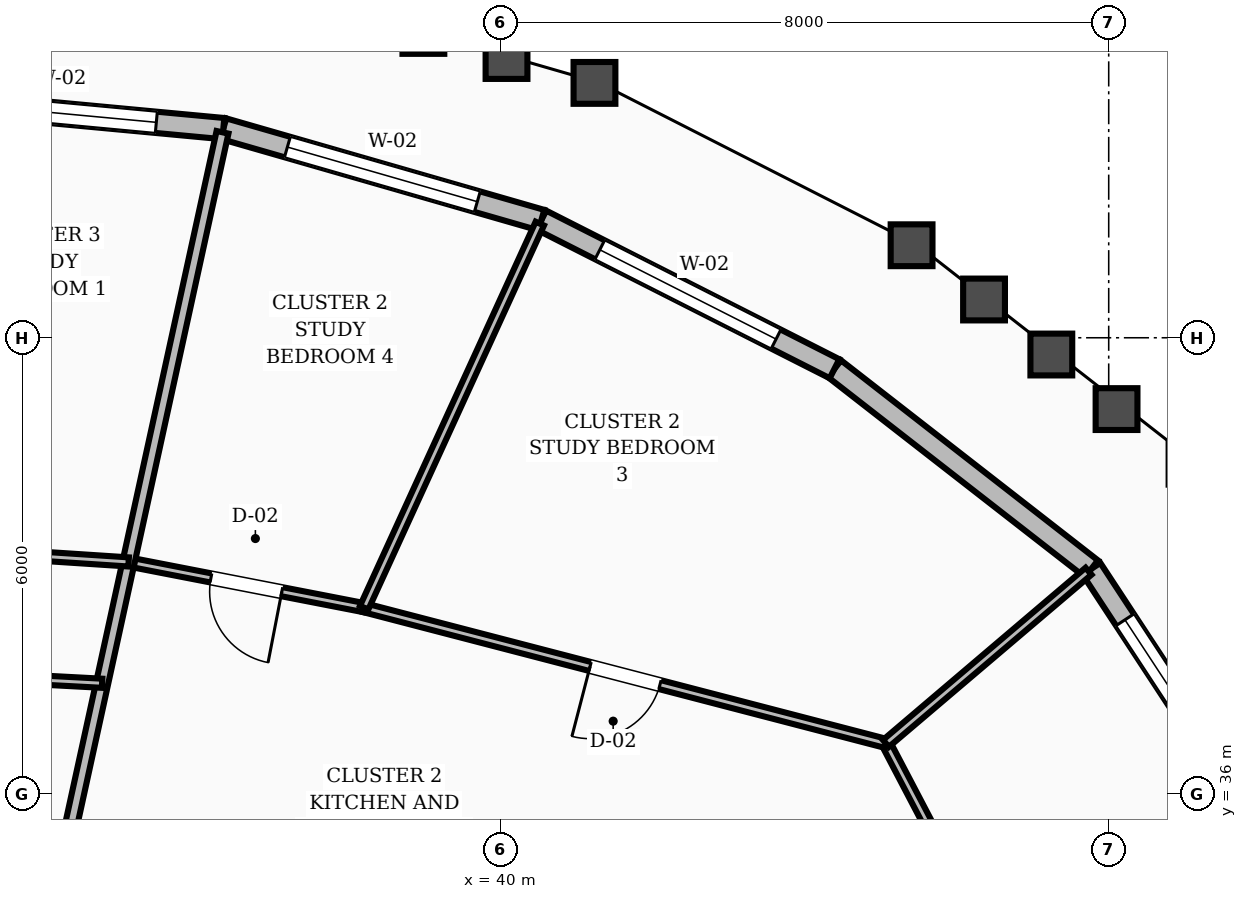
"""IFC4 building model, lengths in metres.
Left out: names, types, materials, properties, quantities, classifications, styles, units other than length and angle.
Written with IfcOpenShell. Run it as: python <this file> out.ifc"""

import sys

from ifc_helpers import new_model, si_unit, direction, frame, frame_2d, origin, place, context, subcontext, project, spatial, rectangle, extrude, element, fill, save


model = new_model("IFC4")
c1 = context("Model", 3, precision=1e-05, world=origin(), true_north=direction((0.0, 1.0)))
c2 = subcontext(c1, "Body", "Model", "MODEL_VIEW")
j1 = project(units=[si_unit("LENGTHUNIT", "METRE"), si_unit("PLANEANGLEUNIT", "RADIAN")], contexts=[c1])
p1 = place(None, origin())
s1 = spatial("IfcSite", under=j1, at=p1, CompositionType="ELEMENT")
p2 = place(p1, origin())
s2 = spatial("IfcBuilding", under=s1, at=p2, CompositionType="ELEMENT")
p3 = place(p2, frame((0.0, 0.0, 232.8)))
s3 = spatial("IfcBuildingStorey", under=s2, at=p3, CompositionType="ELEMENT", Elevation=232.8)
p4 = place(p3, frame((50.132, 35.367, 0.0), z_axis=(0.0, 0.0, 1.0), x_axis=(-0.548657681843, 0.836047096852, 0.0)))
e1 = element("IfcWall", 1, at=p4, inside=s3, PredefinedType="STANDARD", context=c2, shape_type="SweptSolid", body=[
    extrude(rectangle(XDim=4.299, YDim=0.28, at=frame_2d((2.15, 0.0))), origin(), (0.0, 0.0, 1.0), 2.88),
])
p5 = place(p4, frame((0.896, 0.0, 0.8)))
e2 = element("IfcOpeningElement", 2, at=p5, cuts=e1, PredefinedType="OPENING", context=c2, shape_type="SweptSolid", body=[
    extrude(rectangle(XDim=2.6, YDim=1.65, at=frame_2d((1.3, 0.825))), frame((0.0, 0.15, 0.0), z_axis=(0.0, -1.0, 0.0), x_axis=(1.0, 0.0, 0.0)), (0.0, 0.0, 1.0), 0.3),
])
p6 = place(p3, frame((47.773, 38.961, 0.0), z_axis=(0.0, 0.0, 1.0), x_axis=(-0.789112773216, 0.614248346475, 0.0)))
e3 = element("IfcWall", 3, at=p6, inside=s3, PredefinedType="STANDARD", context=c2, shape_type="SweptSolid", body=[
    extrude(rectangle(XDim=4.283, YDim=0.28, at=frame_2d((2.142, 0.0))), origin(), (0.0, 0.0, 1.0), 2.88),
])
p7 = place(p3, frame((44.393, 41.592, 0.0), z_axis=(0.0, 0.0, 1.0), x_axis=(-0.891906133231, 0.452220576162, 0.0)))
e4 = element("IfcWall", 4, at=p7, inside=s3, PredefinedType="STANDARD", context=c2, shape_type="SweptSolid", body=[
    extrude(rectangle(XDim=4.324, YDim=0.28, at=frame_2d((2.162, 0.0))), origin(), (0.0, 0.0, 1.0), 2.88),
])
p8 = place(p7, frame((0.862, 0.0, 0.8)))
e5 = element("IfcOpeningElement", 5, at=p8, cuts=e4, PredefinedType="OPENING", context=c2, shape_type="SweptSolid", body=[
    extrude(rectangle(XDim=2.6, YDim=1.65, at=frame_2d((1.3, 0.825))), frame((0.0, 0.15, 0.0), z_axis=(0.0, -1.0, 0.0), x_axis=(1.0, 0.0, 0.0)), (0.0, 0.0, 1.0), 0.3),
])
p9 = place(p3, frame((40.536, 43.548, 0.0), z_axis=(0.0, 0.0, 1.0), x_axis=(-0.961001713186, 0.276542414927, 0.0)))
e6 = element("IfcWall", 6, at=p9, inside=s3, PredefinedType="STANDARD", context=c2, shape_type="SweptSolid", body=[
    extrude(rectangle(XDim=4.354, YDim=0.28, at=frame_2d((2.177, 0.0))), origin(), (0.0, 0.0, 1.0), 2.88),
])
p10 = place(p9, frame((0.877, 0.0, 0.8)))
e7 = element("IfcOpeningElement", 7, at=p10, cuts=e6, PredefinedType="OPENING", context=c2, shape_type="SweptSolid", body=[
    extrude(rectangle(XDim=2.6, YDim=1.65, at=frame_2d((1.3, 0.825))), frame((0.0, 0.15, 0.0), z_axis=(0.0, -1.0, 0.0), x_axis=(1.0, 0.0, 0.0)), (0.0, 0.0, 1.0), 0.3),
])
p11 = place(p3, frame((36.352, 44.752, 0.0), z_axis=(0.0, 0.0, 1.0), x_axis=(-0.995665801827, 0.093003285276, 0.0)))
e8 = element("IfcWall", 8, at=p11, inside=s3, PredefinedType="STANDARD", context=c2, shape_type="SweptSolid", body=[
    extrude(rectangle(XDim=4.371, YDim=0.28, at=frame_2d((2.186, 0.0))), origin(), (0.0, 0.0, 1.0), 2.88),
])
p12 = place(p11, frame((0.885, 0.0, 0.8)))
e9 = element("IfcOpeningElement", 9, at=p12, cuts=e8, PredefinedType="OPENING", context=c2, shape_type="SweptSolid", body=[
    extrude(rectangle(XDim=2.6, YDim=1.65, at=frame_2d((1.3, 0.825))), frame((0.0, 0.15, 0.0), z_axis=(0.0, -1.0, 0.0), x_axis=(1.0, 0.0, 0.0)), (0.0, 0.0, 1.0), 0.3),
])
p13 = place(p3, frame((48.285, 30.526, 0.0), z_axis=(0.0, 0.0, 1.0), x_axis=(-0.464213686546, 0.885723237373, 0.0)))
e10 = element("IfcWall", 10, at=p13, inside=s3, PredefinedType="PARTITIONING", context=c2, shape_type="SweptSolid", body=[
    extrude(rectangle(XDim=6.929, YDim=0.12, at=frame_2d((3.464, 0.0))), origin(), (0.0, 0.0, 1.0), 2.87),
])
p14 = place(p13, frame((2.99, 0.0, 0.0)))
e11 = element("IfcOpeningElement", 11, at=p14, cuts=e10, PredefinedType="OPENING", context=c2, shape_type="SweptSolid", body=[
    extrude(rectangle(XDim=0.95, YDim=2.1, at=frame_2d((0.475, 1.05))), frame((0.0, 0.07, 0.0), z_axis=(0.0, -1.0, 0.0), x_axis=(1.0, 0.0, 0.0)), (0.0, 0.0, 1.0), 0.14),
])
p15 = place(p3, frame((45.069, 36.663, 0.0), z_axis=(0.0, 0.0, 1.0), x_axis=(-0.967790308664, 0.251757658186, 0.0)))
e12 = element("IfcWall", 12, at=p15, inside=s3, PredefinedType="PARTITIONING", context=c2, shape_type="SweptSolid", body=[
    extrude(rectangle(XDim=7.093, YDim=0.12, at=frame_2d((3.546, 0.0))), origin(), (0.0, 0.0, 1.0), 2.87),
])
p16 = place(p15, frame((3.071, 0.0, 0.0)))
e13 = element("IfcOpeningElement", 13, at=p16, cuts=e12, PredefinedType="OPENING", context=c2, shape_type="SweptSolid", body=[
    extrude(rectangle(XDim=0.95, YDim=2.1, at=frame_2d((0.475, 1.05))), frame((0.0, 0.07, 0.0), z_axis=(0.0, -1.0, 0.0), x_axis=(1.0, 0.0, 0.0)), (0.0, 0.0, 1.0), 0.14),
])
p17 = place(p3, frame((45.069, 36.663, 0.0), z_axis=(0.0, 0.0, 1.0), x_axis=(0.761978918381, 0.647601828242, 0.0)))
e14 = element("IfcWall", 14, at=p17, inside=s3, PredefinedType="PARTITIONING", context=c2, shape_type="SweptSolid", body=[
    extrude(rectangle(XDim=3.499, YDim=0.12, at=frame_2d((1.749, 0.0))), origin(), (0.0, 0.0, 1.0), 2.87),
])
p18 = place(p3, frame((38.205, 38.449, 0.0), z_axis=(0.0, 0.0, 1.0), x_axis=(-0.981645564912, 0.190714406608, 0.0)))
e15 = element("IfcWall", 15, at=p18, inside=s3, PredefinedType="PARTITIONING", context=c2, shape_type="SweptSolid", body=[
    extrude(rectangle(XDim=3.157, YDim=0.12, at=frame_2d((1.578, 0.0))), origin(), (0.0, 0.0, 1.0), 2.87),
])
p19 = place(p18, frame((1.103, 0.0, 0.0)))
e16 = element("IfcOpeningElement", 16, at=p19, cuts=e15, PredefinedType="OPENING", context=c2, shape_type="SweptSolid", body=[
    extrude(rectangle(XDim=0.95, YDim=2.1, at=frame_2d((0.475, 1.05))), frame((0.0, 0.07, 0.0), z_axis=(0.0, -1.0, 0.0), x_axis=(1.0, 0.0, 0.0)), (0.0, 0.0, 1.0), 0.14),
])
p20 = place(p3, frame((38.205, 38.449, 0.0), z_axis=(0.0, 0.0, 1.0), x_axis=(0.415854245642, 0.909431276338, 0.0)))
e17 = element("IfcWall", 17, at=p20, inside=s3, PredefinedType="PARTITIONING", context=c2, shape_type="SweptSolid", body=[
    extrude(rectangle(XDim=5.557, YDim=0.12, at=frame_2d((2.778, 0.0))), origin(), (0.0, 0.0, 1.0), 2.87),
])
p21 = place(p3, frame((33.86, 33.35, 0.0), z_axis=(0.0, 0.0, 1.0), x_axis=(0.213514549004, 0.976939884212, 0.0)))
e18 = element("IfcWall", 18, at=p21, inside=s3, PredefinedType="SOLIDWALL", context=c2, shape_type="SweptSolid", body=[
    extrude(rectangle(XDim=11.621, YDim=0.16, at=frame_2d((5.811, 0.0))), origin(), (0.0, 0.0, 1.0), 2.87),
])
p22 = place(p3, frame((34.757, 37.455, 0.0), z_axis=(0.0, 0.0, 1.0), x_axis=(-0.998591320033, 0.053060112648, 0.0)))
e19 = element("IfcWall", 19, at=p22, inside=s3, PredefinedType="PARTITIONING", context=c2, shape_type="SweptSolid", body=[
    extrude(rectangle(XDim=2.761, YDim=0.12, at=frame_2d((1.38, 0.0))), origin(), (0.0, 0.0, 1.0), 2.87),
])
p23 = place(p3, frame((35.106, 39.051, 0.0), z_axis=(0.0, 0.0, 1.0), x_axis=(-0.997862906262, 0.06534233165, 0.0)))
e20 = element("IfcWall", 20, at=p23, inside=s3, PredefinedType="PARTITIONING", context=c2, shape_type="SweptSolid", body=[
    extrude(rectangle(XDim=3.112, YDim=0.12, at=frame_2d((1.556, 0.0))), origin(), (0.0, 0.0, 1.0), 2.87),
])
p24 = place(p23, frame((1.081, 0.0, 0.0)))
e21 = element("IfcOpeningElement", 21, at=p24, cuts=e20, PredefinedType="OPENING", context=c2, shape_type="SweptSolid", body=[
    extrude(rectangle(XDim=0.95, YDim=2.1, at=frame_2d((0.475, 1.05))), frame((0.0, 0.07, 0.0), z_axis=(0.0, -1.0, 0.0), x_axis=(1.0, 0.0, 0.0)), (0.0, 0.0, 1.0), 0.14),
])
p25 = place(p5, origin())
e22 = element("IfcWindow", 22, at=p25, inside=s3, PartitioningType="SINGLE_PANEL", PredefinedType="WINDOW", context=c2, shape_type="SweptSolid", body=[
    extrude(rectangle(XDim=2.6, YDim=1.65, at=frame_2d((1.3, 0.825))), frame((0.0, 0.03, 0.0), z_axis=(0.0, -1.0, 0.0), x_axis=(1.0, 0.0, 0.0)), (0.0, 0.0, 1.0), 0.06),
])
fill(e2, e22)
p26 = place(p8, origin())
e23 = element("IfcWindow", 23, at=p26, inside=s3, PartitioningType="SINGLE_PANEL", PredefinedType="WINDOW", context=c2, shape_type="SweptSolid", body=[
    extrude(rectangle(XDim=2.6, YDim=1.65, at=frame_2d((1.3, 0.825))), frame((0.0, 0.03, 0.0), z_axis=(0.0, -1.0, 0.0), x_axis=(1.0, 0.0, 0.0)), (0.0, 0.0, 1.0), 0.06),
])
fill(e5, e23)
p27 = place(p10, origin())
e24 = element("IfcWindow", 24, at=p27, inside=s3, PartitioningType="SINGLE_PANEL", PredefinedType="WINDOW", context=c2, shape_type="SweptSolid", body=[
    extrude(rectangle(XDim=2.6, YDim=1.65, at=frame_2d((1.3, 0.825))), frame((0.0, 0.03, 0.0), z_axis=(0.0, -1.0, 0.0), x_axis=(1.0, 0.0, 0.0)), (0.0, 0.0, 1.0), 0.06),
])
fill(e7, e24)
p28 = place(p12, origin())
e25 = element("IfcWindow", 25, at=p28, inside=s3, PartitioningType="SINGLE_PANEL", PredefinedType="WINDOW", context=c2, shape_type="SweptSolid", body=[
    extrude(rectangle(XDim=2.6, YDim=1.65, at=frame_2d((1.3, 0.825))), frame((0.0, 0.03, 0.0), z_axis=(0.0, -1.0, 0.0), x_axis=(1.0, 0.0, 0.0)), (0.0, 0.0, 1.0), 0.06),
])
fill(e9, e25)
p29 = place(p16, origin())
e26 = element("IfcDoor", 26, at=p29, inside=s3, OperationType="SINGLE_SWING_RIGHT", PredefinedType="DOOR", context=c2, shape_type="SweptSolid", body=[
    extrude(rectangle(XDim=0.95, YDim=2.1, at=frame_2d((0.475, 1.05))), frame((0.0, 0.025, 0.0), z_axis=(0.0, -1.0, 0.0), x_axis=(1.0, 0.0, 0.0)), (0.0, 0.0, 1.0), 0.05),
])
fill(e13, e26)
p30 = place(p19, origin())
e27 = element("IfcDoor", 27, at=p30, inside=s3, OperationType="SINGLE_SWING_LEFT", PredefinedType="DOOR", context=c2, shape_type="SweptSolid", body=[
    extrude(rectangle(XDim=0.95, YDim=2.1, at=frame_2d((0.475, 1.05))), frame((0.0, 0.025, 0.0), z_axis=(0.0, -1.0, 0.0), x_axis=(1.0, 0.0, 0.0)), (0.0, 0.0, 1.0), 0.05),
])
fill(e16, e27)
save(model, sys.argv[1])
